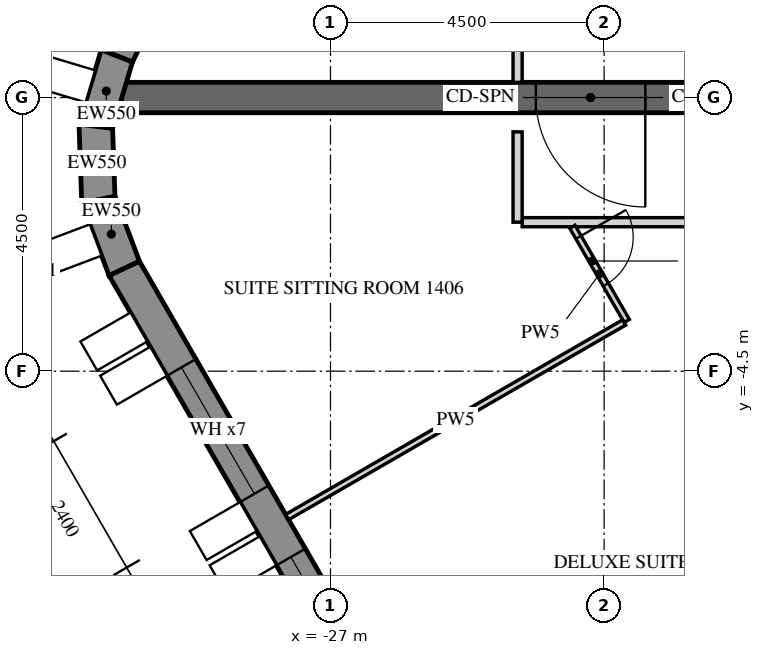
"""IFC4 building model, lengths in metres.
Left out: names, types, materials, properties, quantities, classifications, styles, units other than length and angle.
Written with IfcOpenShell. Run it as: python <this file> out.ifc"""

import sys

from ifc_helpers import new_model, si_unit, direction, frame, frame_2d, origin, place, context, subcontext, project, spatial, polyline, rectangle, outline, extrude, element, fill, save


model = new_model("IFC4")
c1 = context("Model", 3, precision=1e-05, world=origin(), true_north=direction((0.0, 1.0)))
c2 = subcontext(c1, "Body", "Model", "MODEL_VIEW")
j1 = project(units=[si_unit("LENGTHUNIT", "METRE"), si_unit("PLANEANGLEUNIT", "RADIAN")], contexts=[c1])
p1 = place(None, origin())
s1 = spatial("IfcSite", under=j1, at=p1, CompositionType="ELEMENT")
p2 = place(p1, origin())
s2 = spatial("IfcBuilding", under=s1, at=p2, CompositionType="ELEMENT")
p3 = place(p2, frame((0.0, 0.0, 183.9)))
s3 = spatial("IfcBuildingStorey", under=s2, at=p3, CompositionType="ELEMENT", Elevation=183.9)
p4 = place(p3, frame((-18.345, 25.633, -0.15), z_axis=(0.0, 0.0, 1.0), x_axis=(-0.43837181828, -0.898793718791, 0.0)))
e1 = element("IfcWall", 1, at=p4, inside=s3, PredefinedType="SOLIDWALL", context=c2, shape_type="SweptSolid", body=[
    extrude(outline(polyline([(-0.026, -0.275), (27.78, -0.275), (27.735, 0.275), (0.026, 0.275), (-0.026, -0.275)])), origin(), (0.0, 0.0, 1.0), 3.9),
])
p5 = place(p4, frame((1.879, 0.0, 1.05)))
e2 = element("IfcOpeningElement", 2, at=p5, cuts=e1, PredefinedType="OPENING", context=c2, shape_type="SweptSolid", body=[
    extrude(rectangle(XDim=2.4, YDim=2.4, at=frame_2d((1.2, 1.2))), frame((0.0, 0.285, 0.0), z_axis=(0.0, -1.0, 0.0), x_axis=(1.0, 0.0, 0.0)), (0.0, 0.0, 1.0), 0.57),
])
p6 = place(p4, frame((5.479, 0.0, 1.05)))
e3 = element("IfcOpeningElement", 3, at=p6, cuts=e1, PredefinedType="OPENING", context=c2, shape_type="SweptSolid", body=[
    extrude(rectangle(XDim=2.4, YDim=2.4, at=frame_2d((1.2, 1.2))), frame((0.0, 0.285, 0.0), z_axis=(0.0, -1.0, 0.0), x_axis=(1.0, 0.0, 0.0)), (0.0, 0.0, 1.0), 0.57),
])
p7 = place(p4, frame((9.079, 0.0, 1.05)))
e4 = element("IfcOpeningElement", 4, at=p7, cuts=e1, PredefinedType="OPENING", context=c2, shape_type="SweptSolid", body=[
    extrude(rectangle(XDim=2.4, YDim=2.4, at=frame_2d((1.2, 1.2))), frame((0.0, 0.285, 0.0), z_axis=(0.0, -1.0, 0.0), x_axis=(1.0, 0.0, 0.0)), (0.0, 0.0, 1.0), 0.57),
])
p8 = place(p4, frame((12.679, 0.0, 1.05)))
e5 = element("IfcOpeningElement", 5, at=p8, cuts=e1, PredefinedType="OPENING", context=c2, shape_type="SweptSolid", body=[
    extrude(rectangle(XDim=2.4, YDim=2.4, at=frame_2d((1.2, 1.2))), frame((0.0, 0.285, 0.0), z_axis=(0.0, -1.0, 0.0), x_axis=(1.0, 0.0, 0.0)), (0.0, 0.0, 1.0), 0.57),
])
p9 = place(p4, frame((16.279, 0.0, 1.05)))
e6 = element("IfcOpeningElement", 6, at=p9, cuts=e1, PredefinedType="OPENING", context=c2, shape_type="SweptSolid", body=[
    extrude(rectangle(XDim=2.4, YDim=2.4, at=frame_2d((1.2, 1.2))), frame((0.0, 0.285, 0.0), z_axis=(0.0, -1.0, 0.0), x_axis=(1.0, 0.0, 0.0)), (0.0, 0.0, 1.0), 0.57),
])
p10 = place(p4, frame((19.879, 0.0, 1.05)))
e7 = element("IfcOpeningElement", 7, at=p10, cuts=e1, PredefinedType="OPENING", context=c2, shape_type="SweptSolid", body=[
    extrude(rectangle(XDim=2.4, YDim=2.4, at=frame_2d((1.2, 1.2))), frame((0.0, 0.285, 0.0), z_axis=(0.0, -1.0, 0.0), x_axis=(1.0, 0.0, 0.0)), (0.0, 0.0, 1.0), 0.57),
])
p11 = place(p4, frame((23.479, 0.0, 1.05)))
e8 = element("IfcOpeningElement", 8, at=p11, cuts=e1, PredefinedType="OPENING", context=c2, shape_type="SweptSolid", body=[
    extrude(rectangle(XDim=2.4, YDim=2.4, at=frame_2d((1.2, 1.2))), frame((0.0, 0.285, 0.0), z_axis=(0.0, -1.0, 0.0), x_axis=(1.0, 0.0, 0.0)), (0.0, 0.0, 1.0), 0.57),
])
p12 = place(p3, frame((-30.513, 0.684, -0.15), z_axis=(0.0, 0.0, 1.0), x_axis=(-0.286736058109, -0.958009620505, 0.0)))
e9 = element("IfcWall", 9, at=p12, inside=s3, PredefinedType="SOLIDWALL", context=c2, shape_type="SweptSolid", body=[
    extrude(outline(polyline([(-0.022, -0.275), (1.253, -0.275), (1.163, 0.275), (0.022, 0.275), (-0.022, -0.275)])), origin(), (0.0, 0.0, 1.0), 3.9),
])
p13 = place(p3, frame((-30.86, -0.473, -0.15), z_axis=(0.0, 0.0, 1.0), x_axis=(0.03495638276, -0.999388838893, 0.0)))
e10 = element("IfcWall", 10, at=p13, inside=s3, PredefinedType="SOLIDWALL", context=c2, shape_type="SweptSolid", body=[
    extrude(outline(polyline([(-0.045, -0.275), (1.253, -0.275), (1.163, 0.275), (0.045, 0.275), (-0.045, -0.275)])), origin(), (0.0, 0.0, 1.0), 3.9),
])
p14 = place(p3, frame((-30.817, -1.681, -0.15), z_axis=(0.0, 0.0, 1.0), x_axis=(0.352850303963, -0.935679786569, 0.0)))
e11 = element("IfcWall", 11, at=p14, inside=s3, PredefinedType="SOLIDWALL", context=c2, shape_type="SweptSolid", body=[
    extrude(outline(polyline([(-0.045, -0.275), (1.23, -0.275), (1.186, 0.275), (0.045, 0.275), (-0.045, -0.275)])), origin(), (0.0, 0.0, 1.0), 3.9),
])
p15 = place(p3, frame((-30.391, -2.811, -0.15), z_axis=(0.0, 0.0, 1.0), x_axis=(0.499998569178, -0.866026229868, 0.0)))
e12 = element("IfcWall", 12, at=p15, inside=s3, PredefinedType="SOLIDWALL", context=c2, shape_type="SweptSolid", body=[
    extrude(outline(polyline([(-0.022, -0.275), (27.783, -0.275), (27.732, 0.275), (0.022, 0.275), (-0.022, -0.275)])), origin(), (0.0, 0.0, 1.0), 3.9),
])
p16 = place(p15, frame((1.879, 0.0, 1.05)))
e13 = element("IfcOpeningElement", 13, at=p16, cuts=e12, PredefinedType="OPENING", context=c2, shape_type="SweptSolid", body=[
    extrude(rectangle(XDim=2.4, YDim=2.4, at=frame_2d((1.2, 1.2))), frame((0.0, 0.285, 0.0), z_axis=(0.0, -1.0, 0.0), x_axis=(1.0, 0.0, 0.0)), (0.0, 0.0, 1.0), 0.57),
])
p17 = place(p15, frame((5.479, 0.0, 1.05)))
e14 = element("IfcOpeningElement", 14, at=p17, cuts=e12, PredefinedType="OPENING", context=c2, shape_type="SweptSolid", body=[
    extrude(rectangle(XDim=2.4, YDim=2.4, at=frame_2d((1.2, 1.2))), frame((0.0, 0.285, 0.0), z_axis=(0.0, -1.0, 0.0), x_axis=(1.0, 0.0, 0.0)), (0.0, 0.0, 1.0), 0.57),
])
p18 = place(p15, frame((9.079, 0.0, 1.05)))
e15 = element("IfcOpeningElement", 15, at=p18, cuts=e12, PredefinedType="OPENING", context=c2, shape_type="SweptSolid", body=[
    extrude(rectangle(XDim=2.4, YDim=2.4, at=frame_2d((1.2, 1.2))), frame((0.0, 0.285, 0.0), z_axis=(0.0, -1.0, 0.0), x_axis=(1.0, 0.0, 0.0)), (0.0, 0.0, 1.0), 0.57),
])
p19 = place(p15, frame((12.679, 0.0, 1.05)))
e16 = element("IfcOpeningElement", 16, at=p19, cuts=e12, PredefinedType="OPENING", context=c2, shape_type="SweptSolid", body=[
    extrude(rectangle(XDim=2.4, YDim=2.4, at=frame_2d((1.2, 1.2))), frame((0.0, 0.285, 0.0), z_axis=(0.0, -1.0, 0.0), x_axis=(1.0, 0.0, 0.0)), (0.0, 0.0, 1.0), 0.57),
])
p20 = place(p15, frame((16.279, 0.0, 1.05)))
e17 = element("IfcOpeningElement", 17, at=p20, cuts=e12, PredefinedType="OPENING", context=c2, shape_type="SweptSolid", body=[
    extrude(rectangle(XDim=2.4, YDim=2.4, at=frame_2d((1.2, 1.2))), frame((0.0, 0.285, 0.0), z_axis=(0.0, -1.0, 0.0), x_axis=(1.0, 0.0, 0.0)), (0.0, 0.0, 1.0), 0.57),
])
p21 = place(p15, frame((19.879, 0.0, 1.05)))
e18 = element("IfcOpeningElement", 18, at=p21, cuts=e12, PredefinedType="OPENING", context=c2, shape_type="SweptSolid", body=[
    extrude(rectangle(XDim=2.4, YDim=2.4, at=frame_2d((1.2, 1.2))), frame((0.0, 0.285, 0.0), z_axis=(0.0, -1.0, 0.0), x_axis=(1.0, 0.0, 0.0)), (0.0, 0.0, 1.0), 0.57),
])
p22 = place(p15, frame((23.479, 0.0, 1.05)))
e19 = element("IfcOpeningElement", 19, at=p22, cuts=e12, PredefinedType="OPENING", context=c2, shape_type="SweptSolid", body=[
    extrude(rectangle(XDim=2.4, YDim=2.4, at=frame_2d((1.2, 1.2))), frame((0.0, 0.285, 0.0), z_axis=(0.0, -1.0, 0.0), x_axis=(1.0, 0.0, 0.0)), (0.0, 0.0, 1.0), 0.57),
])
p23 = place(p3, frame((-15.011, 0.0, -0.15), z_axis=(0.0, 0.0, 1.0), x_axis=(-1.0, 0.0, 0.0)))
e20 = element("IfcWall", 20, at=p23, inside=s3, PredefinedType="SHEAR", context=c2, shape_type="SweptSolid", body=[
    extrude(rectangle(XDim=15.424, YDim=0.5, at=frame_2d((7.712, 0.0))), origin(), (0.0, 0.0, 1.0), 3.9),
])
p24 = place(p23, frame((6.812, 0.0, 0.15)))
e21 = element("IfcOpeningElement", 21, at=p24, cuts=e20, PredefinedType="OPENING", context=c2, shape_type="SweptSolid", body=[
    extrude(rectangle(XDim=1.8, YDim=2.4, at=frame_2d((0.9, 1.2))), frame((0.0, 0.26, 0.0), z_axis=(0.0, -1.0, 0.0), x_axis=(1.0, 0.0, 0.0)), (0.0, 0.0, 1.0), 0.52),
])
p25 = place(p3, frame((-23.923, 1.975, 0.0), z_axis=(0.0, 0.0, 1.0), x_axis=(0.0, -1.0, 0.0)))
e22 = element("IfcWall", 22, at=p25, inside=s3, PredefinedType="PARTITIONING", context=c2, shape_type="SweptSolid", body=[
    extrude(rectangle(XDim=1.725, YDim=0.15, at=frame_2d((0.863, 0.0))), origin(), (0.0, 0.0, 1.0), 2.988),
])
p26 = place(p3, frame((-23.848, -2.05, 0.0), z_axis=(0.0, 0.0, 1.0), x_axis=(1.0, 0.0, 0.0)))
e23 = element("IfcWall", 23, at=p26, inside=s3, PredefinedType="PARTITIONING", context=c2, shape_type="SweptSolid", body=[
    extrude(rectangle(XDim=7.711, YDim=0.15, at=frame_2d((3.855, 0.0))), origin(), (0.0, 0.0, 1.0), 2.988),
])
p27 = place(p3, frame((-23.923, -0.564, 0.0), z_axis=(0.0, 0.0, 1.0), x_axis=(0.0, -1.0, 0.0)))
e24 = element("IfcWall", 24, at=p27, inside=s3, PredefinedType="PARTITIONING", context=c2, shape_type="SweptSolid", body=[
    extrude(rectangle(XDim=1.486, YDim=0.15, at=frame_2d((0.743, 0.0))), origin(), (0.0, 0.0, 1.0), 2.988),
])
p28 = place(p3, frame((-23.022, -2.125, 0.0), z_axis=(0.0, 0.0, 1.0), x_axis=(0.499927291608, -0.866067377925, 0.0)))
e25 = element("IfcWall", 25, at=p28, inside=s3, PredefinedType="PARTITIONING", context=c2, shape_type="SweptSolid", body=[
    extrude(rectangle(XDim=1.788, YDim=0.1, at=frame_2d((0.894, 0.0))), origin(), (0.0, 0.0, 1.0), 2.988),
])
p29 = place(p28, frame((0.2, 0.0, 0.0)))
e26 = element("IfcOpeningElement", 26, at=p29, cuts=e25, PredefinedType="OPENING", context=c2, shape_type="SweptSolid", body=[
    extrude(rectangle(XDim=0.9, YDim=2.1, at=frame_2d((0.45, 1.05))), frame((0.0, 0.06, 0.0), z_axis=(0.0, -1.0, 0.0), x_axis=(1.0, 0.0, 0.0)), (0.0, 0.0, 1.0), 0.12),
])
p30 = place(p3, frame((-22.171, -3.699, 0.0), z_axis=(0.0, 0.0, 1.0), x_axis=(-0.866025499775, -0.499999833739, 0.0)))
e27 = element("IfcWall", 27, at=p30, inside=s3, PredefinedType="PARTITIONING", context=c2, shape_type="SweptSolid", body=[
    extrude(rectangle(XDim=6.4, YDim=0.1, at=frame_2d((3.2, 0.0))), origin(), (0.0, 0.0, 1.0), 2.988),
])
p31 = place(p3, frame((-24.114, -13.134, 0.0), z_axis=(0.0, 0.0, 1.0), x_axis=(0.866024931941, 0.500000817256, 0.0)))
e28 = element("IfcWall", 28, at=p31, inside=s3, PredefinedType="PARTITIONING", context=c2, shape_type="SweptSolid", body=[
    extrude(rectangle(XDim=12.375, YDim=0.18, at=frame_2d((6.188, 0.0))), origin(), (0.0, 0.0, 1.0), 2.988),
])
p32 = place(p16, frame((0.0, 0.205, 0.0)))
e29 = element("IfcWindow", 29, at=p32, inside=s3, PartitioningType="DOUBLE_PANEL_VERTICAL", PredefinedType="WINDOW", context=c2, shape_type="SweptSolid", body=[
    extrude(rectangle(XDim=2.4, YDim=2.4, at=frame_2d((1.2, 1.2))), frame((0.0, 0.03, 0.0), z_axis=(0.0, -1.0, 0.0), x_axis=(1.0, 0.0, 0.0)), (0.0, 0.0, 1.0), 0.06),
])
fill(e13, e29)
p33 = place(p17, frame((0.0, 0.205, 0.0)))
e30 = element("IfcWindow", 30, at=p33, inside=s3, PartitioningType="DOUBLE_PANEL_VERTICAL", PredefinedType="WINDOW", context=c2, shape_type="SweptSolid", body=[
    extrude(rectangle(XDim=2.4, YDim=2.4, at=frame_2d((1.2, 1.2))), frame((0.0, 0.03, 0.0), z_axis=(0.0, -1.0, 0.0), x_axis=(1.0, 0.0, 0.0)), (0.0, 0.0, 1.0), 0.06),
])
fill(e14, e30)
p34 = place(p24, origin())
e31 = element("IfcDoor", 31, at=p34, inside=s3, OperationType="DOUBLE_DOOR_SINGLE_SWING", PredefinedType="DOOR", context=c2, shape_type="SweptSolid", body=[
    extrude(rectangle(XDim=1.8, YDim=2.4, at=frame_2d((0.9, 1.2))), frame((0.0, 0.025, 0.0), z_axis=(0.0, -1.0, 0.0), x_axis=(1.0, 0.0, 0.0)), (0.0, 0.0, 1.0), 0.05),
])
fill(e21, e31)
p35 = place(p29, origin())
e32 = element("IfcDoor", 32, at=p35, inside=s3, OperationType="SINGLE_SWING_RIGHT", PredefinedType="DOOR", context=c2, shape_type="SweptSolid", body=[
    extrude(rectangle(XDim=0.9, YDim=2.1, at=frame_2d((0.45, 1.05))), frame((0.0, 0.025, 0.0), z_axis=(0.0, -1.0, 0.0), x_axis=(1.0, 0.0, 0.0)), (0.0, 0.0, 1.0), 0.05),
])
fill(e26, e32)
save(model, sys.argv[1])
